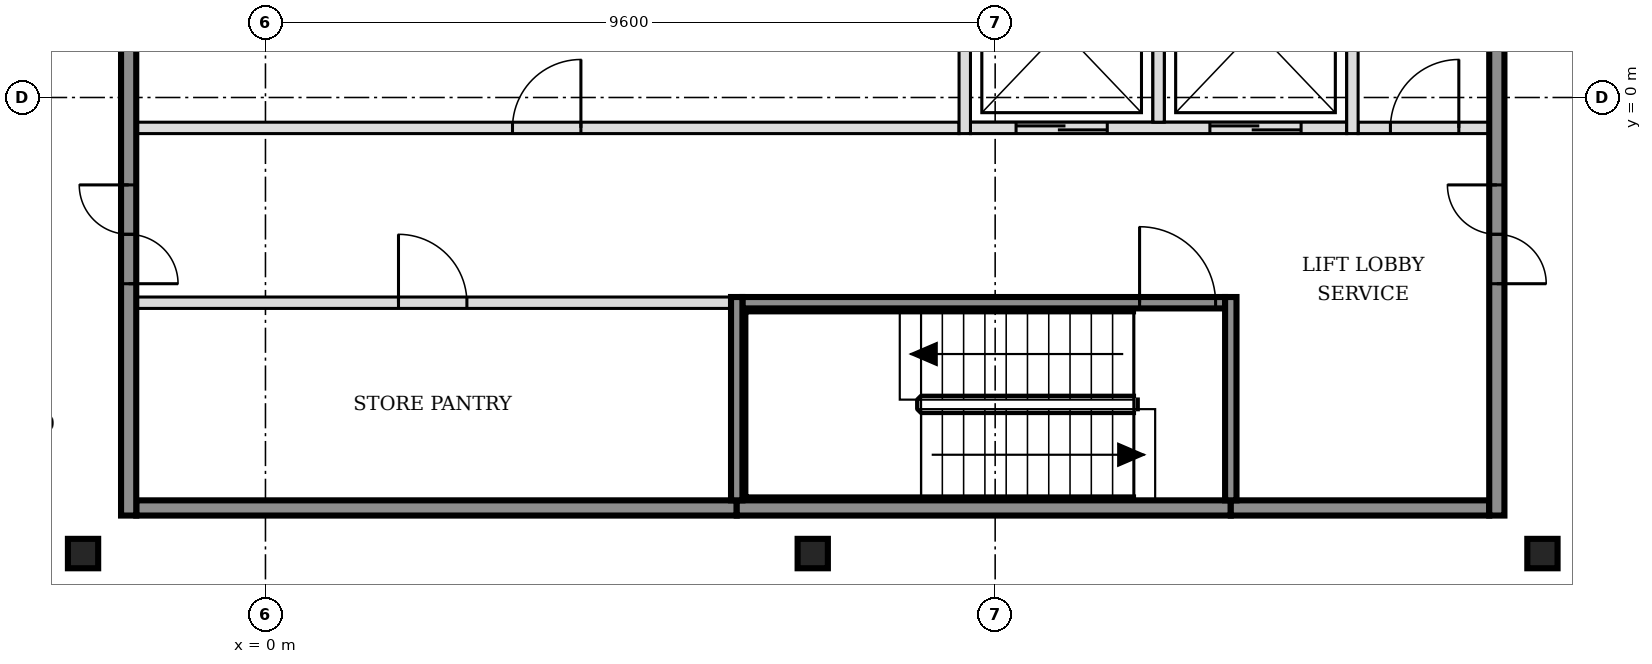
"""IFC4 building model, lengths in metres.
Left out: names, types, materials, properties, quantities, classifications, styles, units other than length and angle.
Written with IfcOpenShell. Run it as: python <this file> out.ifc"""

import sys

from ifc_helpers import new_model, si_unit, direction, frame, frame_2d, origin, origin_2d, place, context, subcontext, project, spatial, rectangle, i_section, extrude, element, fill, save


model = new_model("IFC4")
c1 = context("Model", 3, precision=1e-05, world=origin(), true_north=direction((0.0, 1.0)))
c2 = subcontext(c1, "Body", "Model", "MODEL_VIEW")
j1 = project(units=[si_unit("LENGTHUNIT", "METRE"), si_unit("PLANEANGLEUNIT", "RADIAN")], contexts=[c1])
p1 = place(None, origin())
s1 = spatial("IfcSite", under=j1, at=p1, CompositionType="ELEMENT")
p2 = place(p1, origin())
s2 = spatial("IfcBuilding", under=s1, at=p2, CompositionType="ELEMENT")
p3 = place(p2, frame((0.0, 0.0, 281.4)))
s3 = spatial("IfcBuildingStorey", under=s2, at=p3, CompositionType="ELEMENT", Elevation=281.4)
for number, where, z_axis, x_axis in (
    (1, (-2.4, -6.0, -0.15), (0.0, 0.0, 1.0), (1.0, 0.0, 0.0)),
    (2, (7.2, -6.0, -0.15), (0.0, 0.0, 1.0), (1.0, 0.0, 0.0)),
    (3, (16.8, -6.0, -0.15), (0.0, 0.0, 1.0), (1.0, 0.0, 0.0)),
):
    element("IfcColumn", number, at=place(p3, frame(where, z_axis=z_axis, x_axis=x_axis)), inside=s3, PredefinedType="COLUMN", context=c2, shape_type="SweptSolid", body=[
        extrude(i_section(OverallWidth=0.398, OverallDepth=0.387, WebThickness=0.021, FlangeThickness=0.033, FilletRadius=0.015, at=origin_2d()), origin(), (0.0, 0.0, 1.0), 3.6),
    ])
p4 = place(p3, frame((-1.7, -5.4, 0.0), z_axis=(0.0, 0.0, 1.0), x_axis=(1.0, 0.0, 0.0)))
e4 = element("IfcWall", 4, at=p4, inside=s3, PredefinedType="SOLIDWALL", context=c2, shape_type="SweptSolid", body=[
    extrude(rectangle(XDim=7.9, YDim=0.2, at=frame_2d((3.95, 0.0))), origin(), (0.0, 0.0, 1.0), 3.45),
])
p5 = place(p3, frame((6.2, -5.4, 0.0), z_axis=(0.0, 0.0, 1.0), x_axis=(1.0, 0.0, 0.0)))
e5 = element("IfcWall", 5, at=p5, inside=s3, PredefinedType="SOLIDWALL", context=c2, shape_type="SweptSolid", body=[
    extrude(rectangle(XDim=6.5, YDim=0.2, at=frame_2d((3.25, 0.0))), origin(), (0.0, 0.0, 1.0), 3.45),
])
p6 = place(p3, frame((12.7, -5.4, 0.0), z_axis=(0.0, 0.0, 1.0), x_axis=(1.0, 0.0, 0.0)))
e6 = element("IfcWall", 6, at=p6, inside=s3, PredefinedType="SOLIDWALL", context=c2, shape_type="SweptSolid", body=[
    extrude(rectangle(XDim=3.4, YDim=0.2, at=frame_2d((1.7, 0.0))), origin(), (0.0, 0.0, 1.0), 3.45),
])
p7 = place(p3, frame((-1.7, -2.7, 0.0), z_axis=(0.0, 0.0, 1.0), x_axis=(1.0, 0.0, 0.0)))
e7 = element("IfcWall", 7, at=p7, inside=s3, PredefinedType="PARTITIONING", context=c2, shape_type="SweptSolid", body=[
    extrude(rectangle(XDim=7.825, YDim=0.15, at=frame_2d((3.913, 0.0))), origin(), (0.0, 0.0, 1.0), 3.45),
])
p8 = place(p7, frame((3.45, 0.0, 0.0)))
e8 = element("IfcOpeningElement", 8, at=p8, cuts=e7, PredefinedType="OPENING", context=c2, shape_type="SweptSolid", body=[
    extrude(rectangle(XDim=0.9, YDim=2.1, at=frame_2d((0.45, 1.05))), frame((0.0, 0.085, 0.0), z_axis=(0.0, -1.0, 0.0), x_axis=(1.0, 0.0, 0.0)), (0.0, 0.0, 1.0), 0.17),
])
p9 = place(p3, frame((6.275, -2.7, 0.0), z_axis=(0.0, 0.0, 1.0), x_axis=(1.0, 0.0, 0.0)))
e9 = element("IfcWall", 9, at=p9, inside=s3, PredefinedType="SOLIDWALL", context=c2, shape_type="SweptSolid", body=[
    extrude(rectangle(XDim=6.35, YDim=0.15, at=frame_2d((3.175, 0.0))), origin(), (0.0, 0.0, 1.0), 3.45),
])
p10 = place(p9, frame((5.225, 0.0, 0.0)))
e10 = element("IfcOpeningElement", 10, at=p10, cuts=e9, PredefinedType="OPENING", context=c2, shape_type="SweptSolid", body=[
    extrude(rectangle(XDim=1.0, YDim=2.1, at=frame_2d((0.5, 1.05))), frame((0.0, 0.085, 0.0), z_axis=(0.0, -1.0, 0.0), x_axis=(1.0, 0.0, 0.0)), (0.0, 0.0, 1.0), 0.17),
])
p11 = place(p3, frame((-1.7, -0.4, 0.0), z_axis=(0.0, 0.0, 1.0), x_axis=(1.0, 0.0, 0.0)))
e11 = element("IfcWall", 11, at=p11, inside=s3, PredefinedType="PARTITIONING", context=c2, shape_type="SweptSolid", body=[
    extrude(rectangle(XDim=10.825, YDim=0.15, at=frame_2d((5.413, 0.0))), origin(), (0.0, 0.0, 1.0), 3.45),
])
p12 = place(p11, frame((4.95, 0.0, 0.0)))
e12 = element("IfcOpeningElement", 12, at=p12, cuts=e11, PredefinedType="OPENING", context=c2, shape_type="SweptSolid", body=[
    extrude(rectangle(XDim=0.9, YDim=2.1, at=frame_2d((0.45, 1.05))), frame((0.0, 0.085, 0.0), z_axis=(0.0, -1.0, 0.0), x_axis=(1.0, 0.0, 0.0)), (0.0, 0.0, 1.0), 0.17),
])
p13 = place(p3, frame((9.275, -0.4, 0.0), z_axis=(0.0, 0.0, 1.0), x_axis=(1.0, 0.0, 0.0)))
e13 = element("IfcWall", 13, at=p13, inside=s3, PredefinedType="SOLIDWALL", context=c2, shape_type="SweptSolid", body=[
    extrude(rectangle(XDim=4.95, YDim=0.15, at=frame_2d((2.475, 0.0))), origin(), (0.0, 0.0, 1.0), 3.45),
])
p14 = place(p13, frame((0.6, 0.0, 0.0)))
e14 = element("IfcOpeningElement", 14, at=p14, cuts=e13, PredefinedType="OPENING", context=c2, shape_type="SweptSolid", body=[
    extrude(rectangle(XDim=1.2, YDim=2.1, at=frame_2d((0.6, 1.05))), frame((0.0, 0.085, 0.0), z_axis=(0.0, -1.0, 0.0), x_axis=(1.0, 0.0, 0.0)), (0.0, 0.0, 1.0), 0.17),
])
p15 = place(p13, frame((3.15, 0.0, 0.0)))
e15 = element("IfcOpeningElement", 15, at=p15, cuts=e13, PredefinedType="OPENING", context=c2, shape_type="SweptSolid", body=[
    extrude(rectangle(XDim=1.2, YDim=2.1, at=frame_2d((0.6, 1.05))), frame((0.0, 0.085, 0.0), z_axis=(0.0, -1.0, 0.0), x_axis=(1.0, 0.0, 0.0)), (0.0, 0.0, 1.0), 0.17),
])
p16 = place(p3, frame((14.375, -0.4, 0.0), z_axis=(0.0, 0.0, 1.0), x_axis=(1.0, 0.0, 0.0)))
e16 = element("IfcWall", 16, at=p16, inside=s3, PredefinedType="PARTITIONING", context=c2, shape_type="SweptSolid", body=[
    extrude(rectangle(XDim=1.725, YDim=0.15, at=frame_2d((0.863, 0.0))), origin(), (0.0, 0.0, 1.0), 3.45),
])
p17 = place(p16, frame((0.425, 0.0, 0.0)))
e17 = element("IfcOpeningElement", 17, at=p17, cuts=e16, PredefinedType="OPENING", context=c2, shape_type="SweptSolid", body=[
    extrude(rectangle(XDim=0.9, YDim=2.1, at=frame_2d((0.45, 1.05))), frame((0.0, 0.085, 0.0), z_axis=(0.0, -1.0, 0.0), x_axis=(1.0, 0.0, 0.0)), (0.0, 0.0, 1.0), 0.17),
])
p18 = place(p3, frame((-1.8, -5.5, 0.0), z_axis=(0.0, 0.0, 1.0), x_axis=(0.0, 1.0, 0.0)))
e18 = element("IfcWall", 18, at=p18, inside=s3, PredefinedType="SOLIDWALL", context=c2, shape_type="SweptSolid", body=[
    extrude(rectangle(XDim=15.8, YDim=0.2, at=frame_2d((7.9, 0.0))), origin(), (0.0, 0.0, 1.0), 3.45),
])
p19 = place(p18, frame((3.05, 0.0, 0.0)))
e19 = element("IfcOpeningElement", 19, at=p19, cuts=e18, PredefinedType="OPENING", context=c2, shape_type="SweptSolid", body=[
    extrude(rectangle(XDim=1.3, YDim=2.1, at=frame_2d((0.65, 1.05))), frame((0.0, 0.11, 0.0), z_axis=(0.0, -1.0, 0.0), x_axis=(1.0, 0.0, 0.0)), (0.0, 0.0, 1.0), 0.22),
])
p20 = place(p18, frame((11.45, 0.0, 0.0)))
e20 = element("IfcOpeningElement", 20, at=p20, cuts=e18, PredefinedType="OPENING", context=c2, shape_type="SweptSolid", body=[
    extrude(rectangle(XDim=1.3, YDim=2.1, at=frame_2d((0.65, 1.05))), frame((0.0, 0.11, 0.0), z_axis=(0.0, -1.0, 0.0), x_axis=(1.0, 0.0, 0.0)), (0.0, 0.0, 1.0), 0.22),
])
p21 = place(p3, frame((6.2, -5.3, 0.0), z_axis=(0.0, 0.0, 1.0), x_axis=(0.0, 1.0, 0.0)))
e21 = element("IfcWall", 21, at=p21, inside=s3, PredefinedType="SOLIDWALL", context=c2, shape_type="SweptSolid", body=[
    extrude(rectangle(XDim=2.675, YDim=0.15, at=frame_2d((1.337, 0.0))), origin(), (0.0, 0.0, 1.0), 3.45),
])
p22 = place(p3, frame((9.2, -0.475, 0.0), z_axis=(0.0, 0.0, 1.0), x_axis=(0.0, 1.0, 0.0)))
e22 = element("IfcWall", 22, at=p22, inside=s3, PredefinedType="SOLIDWALL", context=c2, shape_type="SweptSolid", body=[
    extrude(rectangle(XDim=2.6, YDim=0.15, at=frame_2d((1.3, 0.0))), origin(), (0.0, 0.0, 1.0), 3.45),
])
p23 = place(p3, frame((11.75, -0.325, 0.0), z_axis=(0.0, 0.0, 1.0), x_axis=(0.0, 1.0, 0.0)))
e23 = element("IfcWall", 23, at=p23, inside=s3, PredefinedType="SOLIDWALL", context=c2, shape_type="SweptSolid", body=[
    extrude(rectangle(XDim=2.45, YDim=0.15, at=frame_2d((1.225, 0.0))), origin(), (0.0, 0.0, 1.0), 3.45),
])
p24 = place(p3, frame((12.7, -5.3, 0.0), z_axis=(0.0, 0.0, 1.0), x_axis=(0.0, 1.0, 0.0)))
e24 = element("IfcWall", 24, at=p24, inside=s3, PredefinedType="SOLIDWALL", context=c2, shape_type="SweptSolid", body=[
    extrude(rectangle(XDim=2.675, YDim=0.15, at=frame_2d((1.337, 0.0))), origin(), (0.0, 0.0, 1.0), 3.45),
])
p25 = place(p3, frame((14.3, -0.475, 0.0), z_axis=(0.0, 0.0, 1.0), x_axis=(0.0, 1.0, 0.0)))
e25 = element("IfcWall", 25, at=p25, inside=s3, PredefinedType="SOLIDWALL", context=c2, shape_type="SweptSolid", body=[
    extrude(rectangle(XDim=2.75, YDim=0.15, at=frame_2d((1.375, 0.0))), origin(), (0.0, 0.0, 1.0), 3.45),
])
p26 = place(p3, frame((16.2, -5.5, 0.0), z_axis=(0.0, 0.0, 1.0), x_axis=(0.0, 1.0, 0.0)))
e26 = element("IfcWall", 26, at=p26, inside=s3, PredefinedType="SOLIDWALL", context=c2, shape_type="SweptSolid", body=[
    extrude(rectangle(XDim=15.8, YDim=0.2, at=frame_2d((7.9, 0.0))), origin(), (0.0, 0.0, 1.0), 3.45),
])
p27 = place(p26, frame((3.05, 0.0, 0.0)))
e27 = element("IfcOpeningElement", 27, at=p27, cuts=e26, PredefinedType="OPENING", context=c2, shape_type="SweptSolid", body=[
    extrude(rectangle(XDim=1.3, YDim=2.1, at=frame_2d((0.65, 1.05))), frame((0.0, 0.11, 0.0), z_axis=(0.0, -1.0, 0.0), x_axis=(1.0, 0.0, 0.0)), (0.0, 0.0, 1.0), 0.22),
])
p28 = place(p26, frame((11.45, 0.0, 0.0)))
e28 = element("IfcOpeningElement", 28, at=p28, cuts=e26, PredefinedType="OPENING", context=c2, shape_type="SweptSolid", body=[
    extrude(rectangle(XDim=1.3, YDim=2.1, at=frame_2d((0.65, 1.05))), frame((0.0, 0.11, 0.0), z_axis=(0.0, -1.0, 0.0), x_axis=(1.0, 0.0, 0.0)), (0.0, 0.0, 1.0), 0.22),
])
p29 = place(p3, frame((14.322, -16.672, 0.0), z_axis=(0.0, 0.0, 1.0), x_axis=(0.707106781187, 0.707106781187, 0.0)))
e29 = element("IfcWall", 29, at=p29, inside=s3, PredefinedType="PARTITIONING", context=c2, shape_type="SweptSolid", body=[
    extrude(rectangle(XDim=23.452, YDim=0.15, at=frame_2d((11.726, 0.0))), origin(), (0.0, 0.0, 1.0), 2.73),
])
p30 = place(p29, frame((0.775, 0.0, 0.0)))
e30 = element("IfcOpeningElement", 30, at=p30, cuts=e29, PredefinedType="OPENING", context=c2, shape_type="SweptSolid", body=[
    extrude(rectangle(XDim=0.9, YDim=2.1, at=frame_2d((0.45, 1.05))), frame((0.0, 0.085, 0.0), z_axis=(0.0, -1.0, 0.0), x_axis=(1.0, 0.0, 0.0)), (0.0, 0.0, 1.0), 0.17),
])
p31 = place(p29, frame((6.489, 0.0, 0.0)))
e31 = element("IfcOpeningElement", 31, at=p31, cuts=e29, PredefinedType="OPENING", context=c2, shape_type="SweptSolid", body=[
    extrude(rectangle(XDim=0.9, YDim=2.1, at=frame_2d((0.45, 1.05))), frame((0.0, 0.085, 0.0), z_axis=(0.0, -1.0, 0.0), x_axis=(1.0, 0.0, 0.0)), (0.0, 0.0, 1.0), 0.17),
])
p32 = place(p29, frame((10.89, 0.0, 0.0)))
e32 = element("IfcOpeningElement", 32, at=p32, cuts=e29, PredefinedType="OPENING", context=c2, shape_type="SweptSolid", body=[
    extrude(rectangle(XDim=0.9, YDim=2.1, at=frame_2d((0.45, 1.05))), frame((0.0, 0.085, 0.0), z_axis=(0.0, -1.0, 0.0), x_axis=(1.0, 0.0, 0.0)), (0.0, 0.0, 1.0), 0.17),
])
p33 = place(p29, frame((14.788, 0.0, 0.0)))
e33 = element("IfcOpeningElement", 33, at=p33, cuts=e29, PredefinedType="OPENING", context=c2, shape_type="SweptSolid", body=[
    extrude(rectangle(XDim=0.9, YDim=2.1, at=frame_2d((0.45, 1.05))), frame((0.0, 0.085, 0.0), z_axis=(0.0, -1.0, 0.0), x_axis=(1.0, 0.0, 0.0)), (0.0, 0.0, 1.0), 0.17),
])
p34 = place(p29, frame((17.689, 0.0, 0.0)))
e34 = element("IfcOpeningElement", 34, at=p34, cuts=e29, PredefinedType="OPENING", context=c2, shape_type="SweptSolid", body=[
    extrude(rectangle(XDim=0.9, YDim=2.1, at=frame_2d((0.45, 1.05))), frame((0.0, 0.085, 0.0), z_axis=(0.0, -1.0, 0.0), x_axis=(1.0, 0.0, 0.0)), (0.0, 0.0, 1.0), 0.17),
])
p35 = place(p14, origin())
e35 = element("IfcDoor", 35, at=p35, inside=s3, OperationType="DOUBLE_DOOR_SLIDING", PredefinedType="DOOR", context=c2, shape_type="SweptSolid", body=[
    extrude(rectangle(XDim=1.2, YDim=2.1, at=frame_2d((0.6, 1.05))), frame((0.0, 0.025, 0.0), z_axis=(0.0, -1.0, 0.0), x_axis=(1.0, 0.0, 0.0)), (0.0, 0.0, 1.0), 0.05),
])
fill(e14, e35)
p36 = place(p15, origin())
e36 = element("IfcDoor", 36, at=p36, inside=s3, OperationType="DOUBLE_DOOR_SLIDING", PredefinedType="DOOR", context=c2, shape_type="SweptSolid", body=[
    extrude(rectangle(XDim=1.2, YDim=2.1, at=frame_2d((0.6, 1.05))), frame((0.0, 0.025, 0.0), z_axis=(0.0, -1.0, 0.0), x_axis=(1.0, 0.0, 0.0)), (0.0, 0.0, 1.0), 0.05),
])
fill(e15, e36)
p37 = place(p10, origin())
e37 = element("IfcDoor", 37, at=p37, inside=s3, OperationType="SINGLE_SWING_LEFT", PredefinedType="DOOR", context=c2, shape_type="SweptSolid", body=[
    extrude(rectangle(XDim=1.0, YDim=2.1, at=frame_2d((0.5, 1.05))), frame((0.0, 0.025, 0.0), z_axis=(0.0, -1.0, 0.0), x_axis=(1.0, 0.0, 0.0)), (0.0, 0.0, 1.0), 0.05),
])
fill(e10, e37)
p38 = place(p19, origin())
e38 = element("IfcDoor", 38, at=p38, inside=s3, OperationType="DOUBLE_DOOR_SINGLE_SWING", PredefinedType="DOOR", context=c2, shape_type="SweptSolid", body=[
    extrude(rectangle(XDim=1.3, YDim=2.1, at=frame_2d((0.65, 1.05))), frame((0.0, 0.025, 0.0), z_axis=(0.0, -1.0, 0.0), x_axis=(1.0, 0.0, 0.0)), (0.0, 0.0, 1.0), 0.05),
])
fill(e19, e38)
p39 = place(p27, origin())
e39 = element("IfcDoor", 39, at=p39, inside=s3, OperationType="DOUBLE_DOOR_SINGLE_SWING", PredefinedType="DOOR", context=c2, shape_type="SweptSolid", body=[
    extrude(rectangle(XDim=1.3, YDim=2.1, at=frame_2d((0.65, 1.05))), frame((0.0, 0.025, 0.0), z_axis=(0.0, -1.0, 0.0), x_axis=(1.0, 0.0, 0.0)), (0.0, 0.0, 1.0), 0.05),
])
fill(e27, e39)
p40 = place(p17, origin())
e40 = element("IfcDoor", 40, at=p40, inside=s3, OperationType="SINGLE_SWING_RIGHT", PredefinedType="DOOR", context=c2, shape_type="SweptSolid", body=[
    extrude(rectangle(XDim=0.9, YDim=2.1, at=frame_2d((0.45, 1.05))), frame((0.0, 0.025, 0.0), z_axis=(0.0, -1.0, 0.0), x_axis=(1.0, 0.0, 0.0)), (0.0, 0.0, 1.0), 0.05),
])
fill(e17, e40)
p41 = place(p8, origin())
e41 = element("IfcDoor", 41, at=p41, inside=s3, OperationType="SINGLE_SWING_LEFT", PredefinedType="DOOR", context=c2, shape_type="SweptSolid", body=[
    extrude(rectangle(XDim=0.9, YDim=2.1, at=frame_2d((0.45, 1.05))), frame((0.0, 0.025, 0.0), z_axis=(0.0, -1.0, 0.0), x_axis=(1.0, 0.0, 0.0)), (0.0, 0.0, 1.0), 0.05),
])
fill(e8, e41)
p42 = place(p12, origin())
e42 = element("IfcDoor", 42, at=p42, inside=s3, OperationType="SINGLE_SWING_RIGHT", PredefinedType="DOOR", context=c2, shape_type="SweptSolid", body=[
    extrude(rectangle(XDim=0.9, YDim=2.1, at=frame_2d((0.45, 1.05))), frame((0.0, 0.025, 0.0), z_axis=(0.0, -1.0, 0.0), x_axis=(1.0, 0.0, 0.0)), (0.0, 0.0, 1.0), 0.05),
])
fill(e12, e42)
save(model, sys.argv[1])
